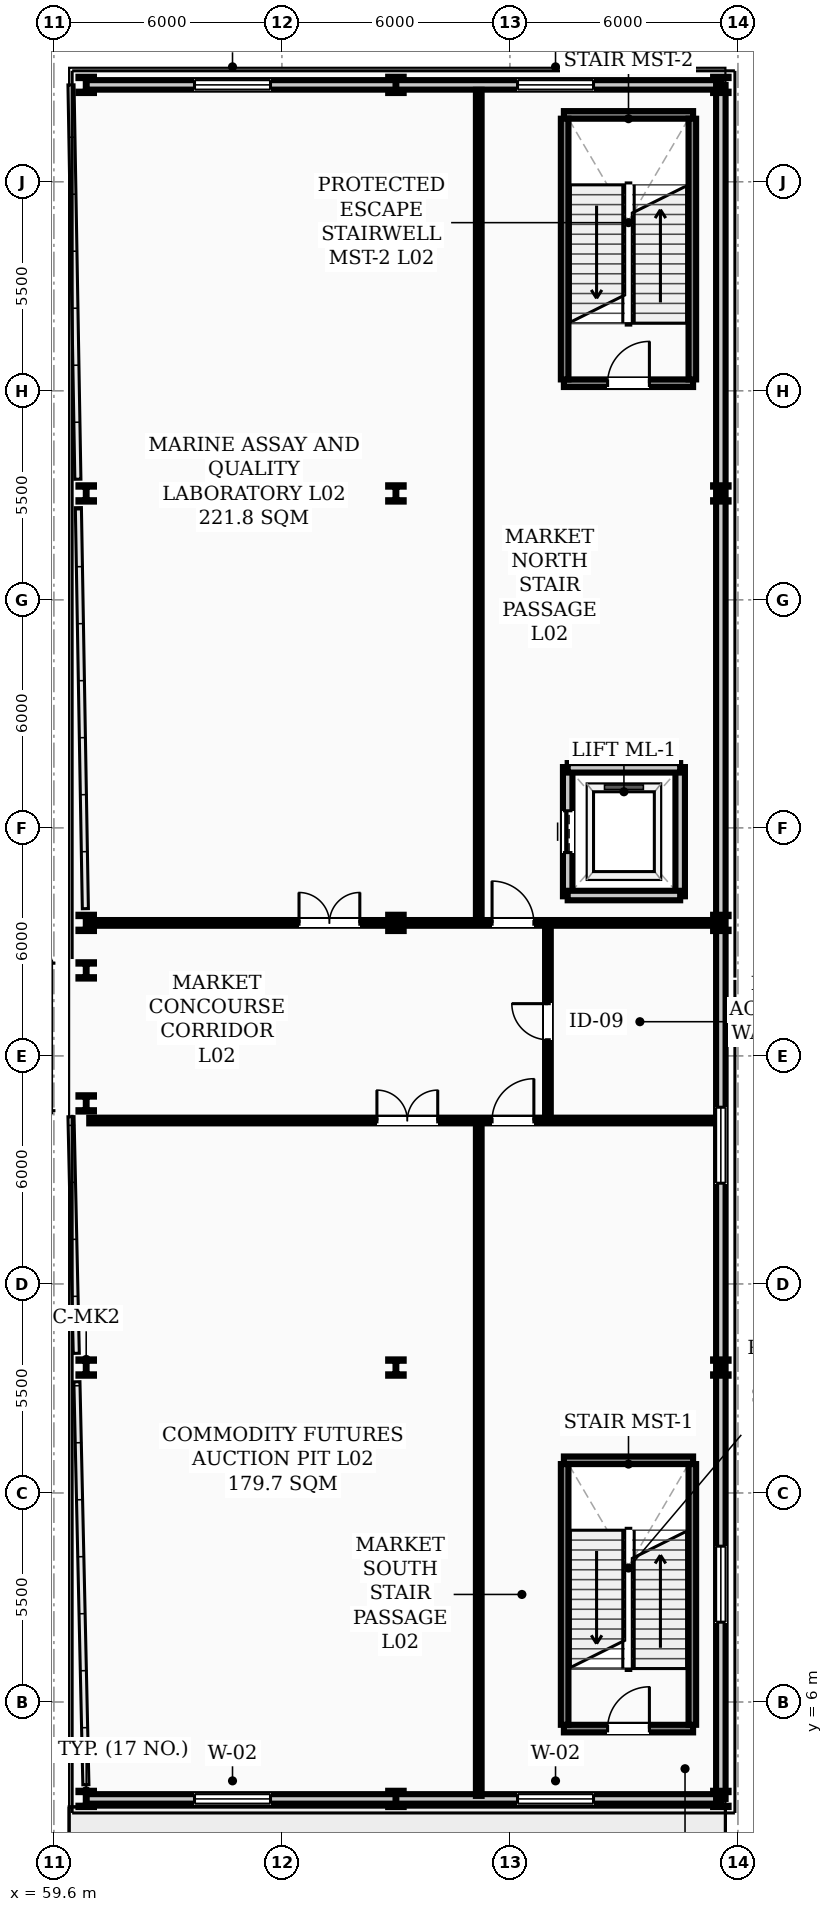
"""IFC4 building model, lengths in metres.
Left out: names, types, materials, properties, quantities, classifications, styles, units other than length and angle.
Written with IfcOpenShell. Run it as: python <this file> out.ifc"""

import sys

from ifc_helpers import new_model, si_unit, direction, frame, frame_2d, origin, origin_2d, place, context, subcontext, project, spatial, rectangle, i_section, extrude, element, fill, save


model = new_model("IFC4")
c1 = context("Model", 3, precision=1e-05, world=origin(), true_north=direction((0.0, 1.0)))
c2 = subcontext(c1, "Body", "Model", "MODEL_VIEW")
j1 = project(units=[si_unit("LENGTHUNIT", "METRE"), si_unit("PLANEANGLEUNIT", "RADIAN")], contexts=[c1])
p1 = place(None, origin())
s1 = spatial("IfcSite", under=j1, at=p1, CompositionType="ELEMENT")
p2 = place(p1, origin())
s2 = spatial("IfcBuilding", under=s1, at=p2, CompositionType="ELEMENT")
p3 = place(p2, frame((0.0, 0.0, 5.8)))
s3 = spatial("IfcBuildingStorey", under=s2, at=p3, CompositionType="ELEMENT", Elevation=5.8)
for number, where, z_axis, x_axis in (
    (1, (60.45, 3.45, 0.0), (0.0, 0.0, 1.0), (1.0, 0.0, 0.0)),
    (2, (60.45, 14.8, 0.0), (0.0, 0.0, 1.0), (1.0, 0.0, 0.0)),
    (3, (60.45, 21.75, 0.0), (0.0, 0.0, 1.0), (1.0, 0.0, 0.0)),
    (4, (60.45, 25.25, 0.0), (0.0, 0.0, 1.0), (1.0, 0.0, 0.0)),
    (5, (60.45, 26.5, 0.0), (0.0, 0.0, 1.0), (1.0, 0.0, 0.0)),
    (6, (60.45, 37.8, 0.0), (0.0, 0.0, 1.0), (1.0, 0.0, 0.0)),
    (7, (60.45, 48.55, 0.0), (0.0, 0.0, 1.0), (1.0, 0.0, 0.0)),
    (8, (68.6, 3.45, 0.0), (0.0, 0.0, 1.0), (1.0, 0.0, 0.0)),
    (9, (68.6, 14.8, 0.0), (0.0, 0.0, 1.0), (1.0, 0.0, 0.0)),
    (10, (68.6, 26.5, 0.0), (0.0, 0.0, 1.0), (1.0, 0.0, 0.0)),
    (11, (68.6, 37.8, 0.0), (0.0, 0.0, 1.0), (1.0, 0.0, 0.0)),
    (12, (68.6, 48.55, 0.0), (0.0, 0.0, 1.0), (1.0, 0.0, 0.0)),
    (13, (77.15, 3.45, 0.0), (0.0, 0.0, 1.0), (1.0, 0.0, 0.0)),
    (14, (77.15, 14.8, 0.0), (0.0, 0.0, 1.0), (1.0, 0.0, 0.0)),
    (15, (77.15, 26.5, 0.0), (0.0, 0.0, 1.0), (1.0, 0.0, 0.0)),
    (16, (77.15, 37.8, 0.0), (0.0, 0.0, 1.0), (1.0, 0.0, 0.0)),
    (17, (77.15, 48.55, 0.0), (0.0, 0.0, 1.0), (1.0, 0.0, 0.0)),
):
    element("IfcColumn", number, at=place(p3, frame(where, z_axis=z_axis, x_axis=x_axis)), inside=s3, PredefinedType="COLUMN", context=c2, shape_type="SweptSolid", body=[
        extrude(i_section(OverallWidth=0.407, OverallDepth=0.428, WebThickness=0.02, FlangeThickness=0.035, FilletRadius=0.022, at=origin_2d()), origin(), (0.0, 0.0, 1.0), 5.4),
    ])
p4 = place(p3, frame((60.45, 3.45, 0.0), z_axis=(0.0, 0.0, 1.0), x_axis=(1.0, 0.0, 0.0)))
e18 = element("IfcWall", 18, at=p4, inside=s3, PredefinedType="STANDARD", context=c2, shape_type="SweptSolid", body=[
    extrude(rectangle(XDim=16.7, YDim=0.25, at=frame_2d((8.35, 0.0))), origin(), (0.0, 0.0, 1.0), 4.5),
])
p5 = place(p4, frame((2.85, 0.0, 0.95)))
e19 = element("IfcOpeningElement", 19, at=p5, cuts=e18, PredefinedType="OPENING", context=c2, shape_type="SweptSolid", body=[
    extrude(rectangle(XDim=2.0, YDim=1.8, at=frame_2d((1.0, 0.9))), frame((0.0, 0.135, 0.0), z_axis=(0.0, -1.0, 0.0), x_axis=(1.0, 0.0, 0.0)), (0.0, 0.0, 1.0), 0.27),
])
p6 = place(p4, frame((11.35, 0.0, 0.95)))
e20 = element("IfcOpeningElement", 20, at=p6, cuts=e18, PredefinedType="OPENING", context=c2, shape_type="SweptSolid", body=[
    extrude(rectangle(XDim=2.0, YDim=1.8, at=frame_2d((1.0, 0.9))), frame((0.0, 0.135, 0.0), z_axis=(0.0, -1.0, 0.0), x_axis=(1.0, 0.0, 0.0)), (0.0, 0.0, 1.0), 0.27),
])
p7 = place(p3, frame((60.45, 48.55, 0.0), z_axis=(0.0, 0.0, 1.0), x_axis=(1.0, 0.0, 0.0)))
e21 = element("IfcWall", 21, at=p7, inside=s3, PredefinedType="STANDARD", context=c2, shape_type="SweptSolid", body=[
    extrude(rectangle(XDim=16.7, YDim=0.25, at=frame_2d((8.35, 0.0))), origin(), (0.0, 0.0, 1.0), 4.5),
])
p8 = place(p7, frame((2.85, 0.0, 0.95)))
e22 = element("IfcOpeningElement", 22, at=p8, cuts=e21, PredefinedType="OPENING", context=c2, shape_type="SweptSolid", body=[
    extrude(rectangle(XDim=2.0, YDim=1.8, at=frame_2d((1.0, 0.9))), frame((0.0, 0.135, 0.0), z_axis=(0.0, -1.0, 0.0), x_axis=(1.0, 0.0, 0.0)), (0.0, 0.0, 1.0), 0.27),
])
p9 = place(p7, frame((11.35, 0.0, 0.95)))
e23 = element("IfcOpeningElement", 23, at=p9, cuts=e21, PredefinedType="OPENING", context=c2, shape_type="SweptSolid", body=[
    extrude(rectangle(XDim=2.0, YDim=1.8, at=frame_2d((1.0, 0.9))), frame((0.0, 0.135, 0.0), z_axis=(0.0, -1.0, 0.0), x_axis=(1.0, 0.0, 0.0)), (0.0, 0.0, 1.0), 0.27),
])
p10 = place(p3, frame((77.15, 3.45, 0.0), z_axis=(0.0, 0.0, 1.0), x_axis=(0.0, 1.0, 0.0)))
e24 = element("IfcWall", 24, at=p10, inside=s3, PredefinedType="STANDARD", context=c2, shape_type="SweptSolid", body=[
    extrude(rectangle(XDim=45.1, YDim=0.25, at=frame_2d((22.55, 0.0))), origin(), (0.0, 0.0, 1.0), 4.5),
])
p11 = place(p10, frame((4.65, 0.0, 0.95)))
e25 = element("IfcOpeningElement", 25, at=p11, cuts=e24, PredefinedType="OPENING", context=c2, shape_type="SweptSolid", body=[
    extrude(rectangle(XDim=2.0, YDim=1.8, at=frame_2d((1.0, 0.9))), frame((0.0, 0.135, 0.0), z_axis=(0.0, -1.0, 0.0), x_axis=(1.0, 0.0, 0.0)), (0.0, 0.0, 1.0), 0.27),
])
p12 = place(p10, frame((16.2, 0.0, 0.95)))
e26 = element("IfcOpeningElement", 26, at=p12, cuts=e24, PredefinedType="OPENING", context=c2, shape_type="SweptSolid", body=[
    extrude(rectangle(XDim=2.0, YDim=1.8, at=frame_2d((1.0, 0.9))), frame((0.0, 0.135, 0.0), z_axis=(0.0, -1.0, 0.0), x_axis=(1.0, 0.0, 0.0)), (0.0, 0.0, 1.0), 0.27),
])
p13 = place(p3, frame((73.02, 5.3, 0.0), z_axis=(0.0, 0.0, 1.0), x_axis=(1.0, 0.0, 0.0)))
e27 = element("IfcWall", 27, at=p13, inside=s3, PredefinedType="STANDARD", context=c2, shape_type="SweptSolid", body=[
    extrude(rectangle(XDim=3.4, YDim=0.2, at=frame_2d((1.7, 0.0))), origin(), (0.0, 0.0, 1.0), 5.18),
])
p14 = place(p13, frame((1.15, 0.0, 0.0)))
e28 = element("IfcOpeningElement", 28, at=p14, cuts=e27, PredefinedType="OPENING", context=c2, shape_type="SweptSolid", body=[
    extrude(rectangle(XDim=1.1, YDim=2.08, at=frame_2d((0.55, 1.04))), frame((0.0, 0.11, 0.0), z_axis=(0.0, -1.0, 0.0), x_axis=(1.0, 0.0, 0.0)), (0.0, 0.0, 1.0), 0.22),
])
p15 = place(p3, frame((73.02, 12.36, 0.0), z_axis=(0.0, 0.0, 1.0), x_axis=(1.0, 0.0, 0.0)))
e29 = element("IfcWall", 29, at=p15, inside=s3, PredefinedType="STANDARD", context=c2, shape_type="SweptSolid", body=[
    extrude(rectangle(XDim=3.4, YDim=0.2, at=frame_2d((1.7, 0.0))), origin(), (0.0, 0.0, 1.0), 5.18),
])
for number, where, z_axis, x_axis in (
    (30, (73.04, 5.4, 0.0), (0.0, 0.0, 1.0), (0.0, 1.0, 0.0)),
    (31, (76.4, 5.4, 0.0), (0.0, 0.0, 1.0), (0.0, 1.0, 0.0)),
):
    element("IfcWall", number, at=place(p3, frame(where, z_axis=z_axis, x_axis=x_axis)), inside=s3, PredefinedType="STANDARD", context=c2, shape_type="SweptSolid", body=[
        extrude(rectangle(XDim=6.86, YDim=0.2, at=frame_2d((3.43, 0.0))), origin(), (0.0, 0.0, 1.0), 5.18),
    ])
p16 = place(p3, frame((73.02, 40.7, 0.0), z_axis=(0.0, 0.0, 1.0), x_axis=(1.0, 0.0, 0.0)))
e32 = element("IfcWall", 32, at=p16, inside=s3, PredefinedType="STANDARD", context=c2, shape_type="SweptSolid", body=[
    extrude(rectangle(XDim=3.4, YDim=0.2, at=frame_2d((1.7, 0.0))), origin(), (0.0, 0.0, 1.0), 5.18),
])
p17 = place(p16, frame((1.15, 0.0, 0.0)))
e33 = element("IfcOpeningElement", 33, at=p17, cuts=e32, PredefinedType="OPENING", context=c2, shape_type="SweptSolid", body=[
    extrude(rectangle(XDim=1.1, YDim=2.08, at=frame_2d((0.55, 1.04))), frame((0.0, 0.11, 0.0), z_axis=(0.0, -1.0, 0.0), x_axis=(1.0, 0.0, 0.0)), (0.0, 0.0, 1.0), 0.22),
])
p18 = place(p3, frame((73.02, 47.76, 0.0), z_axis=(0.0, 0.0, 1.0), x_axis=(1.0, 0.0, 0.0)))
e34 = element("IfcWall", 34, at=p18, inside=s3, PredefinedType="STANDARD", context=c2, shape_type="SweptSolid", body=[
    extrude(rectangle(XDim=3.4, YDim=0.2, at=frame_2d((1.7, 0.0))), origin(), (0.0, 0.0, 1.0), 5.18),
])
for number, where, z_axis, x_axis in (
    (35, (73.04, 40.8, 0.0), (0.0, 0.0, 1.0), (0.0, 1.0, 0.0)),
    (36, (76.4, 40.8, 0.0), (0.0, 0.0, 1.0), (0.0, 1.0, 0.0)),
):
    element("IfcWall", number, at=place(p3, frame(where, z_axis=z_axis, x_axis=x_axis)), inside=s3, PredefinedType="STANDARD", context=c2, shape_type="SweptSolid", body=[
        extrude(rectangle(XDim=6.86, YDim=0.2, at=frame_2d((3.43, 0.0))), origin(), (0.0, 0.0, 1.0), 5.18),
    ])
p19 = place(p3, frame((73.12, 27.2, 0.0), z_axis=(0.0, 0.0, 1.0), x_axis=(0.0, 1.0, 0.0)))
e37 = element("IfcWall", 37, at=p19, inside=s3, PredefinedType="STANDARD", context=c2, shape_type="SweptSolid", body=[
    extrude(rectangle(XDim=3.4, YDim=0.25, at=frame_2d((1.7, 0.0))), origin(), (0.0, 0.0, 1.0), 5.15),
])
p20 = place(p19, frame((1.15, 0.0, 0.0)))
e38 = element("IfcOpeningElement", 38, at=p20, cuts=e37, PredefinedType="OPENING", context=c2, shape_type="SweptSolid", body=[
    extrude(rectangle(XDim=1.1, YDim=2.08, at=frame_2d((0.55, 1.04))), frame((0.0, 0.135, 0.0), z_axis=(0.0, -1.0, 0.0), x_axis=(1.0, 0.0, 0.0)), (0.0, 0.0, 1.0), 0.27),
])
p21 = place(p3, frame((76.08, 27.2, 0.0), z_axis=(0.0, 0.0, 1.0), x_axis=(0.0, 1.0, 0.0)))
e39 = element("IfcWall", 39, at=p21, inside=s3, PredefinedType="STANDARD", context=c2, shape_type="SweptSolid", body=[
    extrude(rectangle(XDim=3.4, YDim=0.25, at=frame_2d((1.7, 0.0))), origin(), (0.0, 0.0, 1.0), 5.15),
])
for number, where, z_axis, x_axis in (
    (40, (73.12, 27.22, 0.0), (0.0, 0.0, 1.0), (1.0, 0.0, 0.0)),
    (41, (73.12, 30.58, 0.0), (0.0, 0.0, 1.0), (1.0, 0.0, 0.0)),
):
    element("IfcWall", number, at=place(p3, frame(where, z_axis=z_axis, x_axis=x_axis)), inside=s3, PredefinedType="STANDARD", context=c2, shape_type="SweptSolid", body=[
        extrude(rectangle(XDim=2.96, YDim=0.25, at=frame_2d((1.48, 0.0))), origin(), (0.0, 0.0, 1.0), 5.15),
    ])
p22 = place(p3, frame((60.53, 21.3, 0.0), z_axis=(0.0, 0.0, 1.0), x_axis=(1.0, 0.0, 0.0)))
e42 = element("IfcWall", 42, at=p22, inside=s3, PredefinedType="PARTITIONING", context=c2, shape_type="SweptSolid", body=[
    extrude(rectangle(XDim=16.49, YDim=0.15, at=frame_2d((8.245, 0.0))), origin(), (0.0, 0.0, 1.0), 3.91),
])
p23 = place(p22, frame((7.57, 0.0, 0.0)))
e43 = element("IfcOpeningElement", 43, at=p23, cuts=e42, PredefinedType="OPENING", context=c2, shape_type="SweptSolid", body=[
    extrude(rectangle(XDim=1.6, YDim=2.08, at=frame_2d((0.8, 1.04))), frame((0.0, 0.085, 0.0), z_axis=(0.0, -1.0, 0.0), x_axis=(1.0, 0.0, 0.0)), (0.0, 0.0, 1.0), 0.17),
])
p24 = place(p22, frame((10.6, 0.0, 0.0)))
e44 = element("IfcOpeningElement", 44, at=p24, cuts=e42, PredefinedType="OPENING", context=c2, shape_type="SweptSolid", body=[
    extrude(rectangle(XDim=1.1, YDim=2.08, at=frame_2d((0.55, 1.04))), frame((0.0, 0.085, 0.0), z_axis=(0.0, -1.0, 0.0), x_axis=(1.0, 0.0, 0.0)), (0.0, 0.0, 1.0), 0.17),
])
p25 = place(p3, frame((60.53, 26.5, 0.0), z_axis=(0.0, 0.0, 1.0), x_axis=(1.0, 0.0, 0.0)))
e45 = element("IfcWall", 45, at=p25, inside=s3, PredefinedType="PARTITIONING", context=c2, shape_type="SweptSolid", body=[
    extrude(rectangle(XDim=16.49, YDim=0.15, at=frame_2d((8.245, 0.0))), origin(), (0.0, 0.0, 1.0), 4.56),
])
p26 = place(p25, frame((5.52, 0.0, 0.0)))
e46 = element("IfcOpeningElement", 46, at=p26, cuts=e45, PredefinedType="OPENING", context=c2, shape_type="SweptSolid", body=[
    extrude(rectangle(XDim=1.6, YDim=2.08, at=frame_2d((0.8, 1.04))), frame((0.0, 0.085, 0.0), z_axis=(0.0, -1.0, 0.0), x_axis=(1.0, 0.0, 0.0)), (0.0, 0.0, 1.0), 0.17),
])
p27 = place(p25, frame((10.6, 0.0, 0.0)))
e47 = element("IfcOpeningElement", 47, at=p27, cuts=e45, PredefinedType="OPENING", context=c2, shape_type="SweptSolid", body=[
    extrude(rectangle(XDim=1.1, YDim=2.08, at=frame_2d((0.55, 1.04))), frame((0.0, 0.085, 0.0), z_axis=(0.0, -1.0, 0.0), x_axis=(1.0, 0.0, 0.0)), (0.0, 0.0, 1.0), 0.17),
])
p28 = place(p3, frame((72.6, 21.385, 0.0), z_axis=(0.0, 0.0, 1.0), x_axis=(0.0, 1.0, 0.0)))
e48 = element("IfcWall", 48, at=p28, inside=s3, PredefinedType="PARTITIONING", context=c2, shape_type="SweptSolid", body=[
    extrude(rectangle(XDim=5.03, YDim=0.15, at=frame_2d((2.515, 0.0))), origin(), (0.0, 0.0, 1.0), 4.56),
])
p29 = place(p28, frame((2.04, 0.0, 0.0)))
e49 = element("IfcOpeningElement", 49, at=p29, cuts=e48, PredefinedType="OPENING", context=c2, shape_type="SweptSolid", body=[
    extrude(rectangle(XDim=0.95, YDim=2.08, at=frame_2d((0.475, 1.04))), frame((0.0, 0.085, 0.0), z_axis=(0.0, -1.0, 0.0), x_axis=(1.0, 0.0, 0.0)), (0.0, 0.0, 1.0), 0.17),
])
p30 = place(p3, frame((70.78, 3.53, 0.0), z_axis=(0.0, 0.0, 1.0), x_axis=(0.0, 1.0, 0.0)))
e50 = element("IfcWall", 50, at=p30, inside=s3, PredefinedType="PARTITIONING", context=c2, shape_type="SweptSolid", body=[
    extrude(rectangle(XDim=17.685, YDim=0.15, at=frame_2d((8.843, 0.0))), origin(), (0.0, 0.0, 1.0), 4.56),
])
p31 = place(p3, frame((70.78, 26.585, 0.0), z_axis=(0.0, 0.0, 1.0), x_axis=(0.0, 1.0, 0.0)))
e51 = element("IfcWall", 51, at=p31, inside=s3, PredefinedType="PARTITIONING", context=c2, shape_type="SweptSolid", body=[
    extrude(rectangle(XDim=21.835, YDim=0.15, at=frame_2d((10.917, 0.0))), origin(), (0.0, 0.0, 1.0), 4.56),
])
p32 = place(p5, origin())
e52 = element("IfcWindow", 52, at=p32, inside=s3, PartitioningType="SINGLE_PANEL", PredefinedType="WINDOW", context=c2, shape_type="SweptSolid", body=[
    extrude(rectangle(XDim=2.0, YDim=1.8, at=frame_2d((1.0, 0.9))), frame((0.0, 0.03, 0.0), z_axis=(0.0, -1.0, 0.0), x_axis=(1.0, 0.0, 0.0)), (0.0, 0.0, 1.0), 0.06),
])
fill(e19, e52)
p33 = place(p8, origin())
e53 = element("IfcWindow", 53, at=p33, inside=s3, PartitioningType="SINGLE_PANEL", PredefinedType="WINDOW", context=c2, shape_type="SweptSolid", body=[
    extrude(rectangle(XDim=2.0, YDim=1.8, at=frame_2d((1.0, 0.9))), frame((0.0, 0.03, 0.0), z_axis=(0.0, -1.0, 0.0), x_axis=(1.0, 0.0, 0.0)), (0.0, 0.0, 1.0), 0.06),
])
fill(e22, e53)
p34 = place(p6, origin())
e54 = element("IfcWindow", 54, at=p34, inside=s3, PartitioningType="SINGLE_PANEL", PredefinedType="WINDOW", context=c2, shape_type="SweptSolid", body=[
    extrude(rectangle(XDim=2.0, YDim=1.8, at=frame_2d((1.0, 0.9))), frame((0.0, 0.03, 0.0), z_axis=(0.0, -1.0, 0.0), x_axis=(1.0, 0.0, 0.0)), (0.0, 0.0, 1.0), 0.06),
])
fill(e20, e54)
p35 = place(p9, origin())
e55 = element("IfcWindow", 55, at=p35, inside=s3, PartitioningType="SINGLE_PANEL", PredefinedType="WINDOW", context=c2, shape_type="SweptSolid", body=[
    extrude(rectangle(XDim=2.0, YDim=1.8, at=frame_2d((1.0, 0.9))), frame((0.0, 0.03, 0.0), z_axis=(0.0, -1.0, 0.0), x_axis=(1.0, 0.0, 0.0)), (0.0, 0.0, 1.0), 0.06),
])
fill(e23, e55)
p36 = place(p11, origin())
e56 = element("IfcWindow", 56, at=p36, inside=s3, PartitioningType="SINGLE_PANEL", PredefinedType="WINDOW", context=c2, shape_type="SweptSolid", body=[
    extrude(rectangle(XDim=2.0, YDim=1.8, at=frame_2d((1.0, 0.9))), frame((0.0, 0.03, 0.0), z_axis=(0.0, -1.0, 0.0), x_axis=(1.0, 0.0, 0.0)), (0.0, 0.0, 1.0), 0.06),
])
fill(e25, e56)
p37 = place(p12, origin())
e57 = element("IfcWindow", 57, at=p37, inside=s3, PartitioningType="SINGLE_PANEL", PredefinedType="WINDOW", context=c2, shape_type="SweptSolid", body=[
    extrude(rectangle(XDim=2.0, YDim=1.8, at=frame_2d((1.0, 0.9))), frame((0.0, 0.03, 0.0), z_axis=(0.0, -1.0, 0.0), x_axis=(1.0, 0.0, 0.0)), (0.0, 0.0, 1.0), 0.06),
])
fill(e26, e57)
p38 = place(p14, origin())
e58 = element("IfcDoor", 58, at=p38, inside=s3, OperationType="SINGLE_SWING_RIGHT", PredefinedType="DOOR", context=c2, shape_type="SweptSolid", body=[
    extrude(rectangle(XDim=1.1, YDim=2.08, at=frame_2d((0.55, 1.04))), frame((0.0, 0.025, 0.0), z_axis=(0.0, -1.0, 0.0), x_axis=(1.0, 0.0, 0.0)), (0.0, 0.0, 1.0), 0.05),
])
fill(e28, e58)
p39 = place(p17, origin())
e59 = element("IfcDoor", 59, at=p39, inside=s3, OperationType="SINGLE_SWING_RIGHT", PredefinedType="DOOR", context=c2, shape_type="SweptSolid", body=[
    extrude(rectangle(XDim=1.1, YDim=2.08, at=frame_2d((0.55, 1.04))), frame((0.0, 0.025, 0.0), z_axis=(0.0, -1.0, 0.0), x_axis=(1.0, 0.0, 0.0)), (0.0, 0.0, 1.0), 0.05),
])
fill(e33, e59)
p40 = place(p23, origin())
e60 = element("IfcDoor", 60, at=p40, inside=s3, OperationType="DOUBLE_DOOR_SINGLE_SWING", PredefinedType="DOOR", context=c2, shape_type="SweptSolid", body=[
    extrude(rectangle(XDim=1.6, YDim=2.08, at=frame_2d((0.8, 1.04))), frame((0.0, 0.025, 0.0), z_axis=(0.0, -1.0, 0.0), x_axis=(1.0, 0.0, 0.0)), (0.0, 0.0, 1.0), 0.05),
])
fill(e43, e60)
p41 = place(p26, origin())
e61 = element("IfcDoor", 61, at=p41, inside=s3, OperationType="DOUBLE_DOOR_SINGLE_SWING", PredefinedType="DOOR", context=c2, shape_type="SweptSolid", body=[
    extrude(rectangle(XDim=1.6, YDim=2.08, at=frame_2d((0.8, 1.04))), frame((0.0, 0.025, 0.0), z_axis=(0.0, -1.0, 0.0), x_axis=(1.0, 0.0, 0.0)), (0.0, 0.0, 1.0), 0.05),
])
fill(e46, e61)
p42 = place(p24, origin())
e62 = element("IfcDoor", 62, at=p42, inside=s3, OperationType="SINGLE_SWING_RIGHT", PredefinedType="DOOR", context=c2, shape_type="SweptSolid", body=[
    extrude(rectangle(XDim=1.1, YDim=2.08, at=frame_2d((0.55, 1.04))), frame((0.0, 0.025, 0.0), z_axis=(0.0, -1.0, 0.0), x_axis=(1.0, 0.0, 0.0)), (0.0, 0.0, 1.0), 0.05),
])
fill(e44, e62)
p43 = place(p27, origin())
e63 = element("IfcDoor", 63, at=p43, inside=s3, OperationType="SINGLE_SWING_LEFT", PredefinedType="DOOR", context=c2, shape_type="SweptSolid", body=[
    extrude(rectangle(XDim=1.1, YDim=2.08, at=frame_2d((0.55, 1.04))), frame((0.0, 0.025, 0.0), z_axis=(0.0, -1.0, 0.0), x_axis=(1.0, 0.0, 0.0)), (0.0, 0.0, 1.0), 0.05),
])
fill(e47, e63)
p44 = place(p29, origin())
e64 = element("IfcDoor", 64, at=p44, inside=s3, OperationType="SINGLE_SWING_RIGHT", PredefinedType="DOOR", context=c2, shape_type="SweptSolid", body=[
    extrude(rectangle(XDim=0.95, YDim=2.08, at=frame_2d((0.475, 1.04))), frame((0.0, 0.025, 0.0), z_axis=(0.0, -1.0, 0.0), x_axis=(1.0, 0.0, 0.0)), (0.0, 0.0, 1.0), 0.05),
])
fill(e49, e64)
p45 = place(p20, origin())
e65 = element("IfcDoor", 65, at=p45, inside=s3, OperationType="SLIDING_TO_LEFT", PredefinedType="DOOR", context=c2, shape_type="SweptSolid", body=[
    extrude(rectangle(XDim=1.1, YDim=2.08, at=frame_2d((0.55, 1.04))), frame((0.0, 0.025, 0.0), z_axis=(0.0, -1.0, 0.0), x_axis=(1.0, 0.0, 0.0)), (0.0, 0.0, 1.0), 0.05),
])
fill(e38, e65)
save(model, sys.argv[1])
